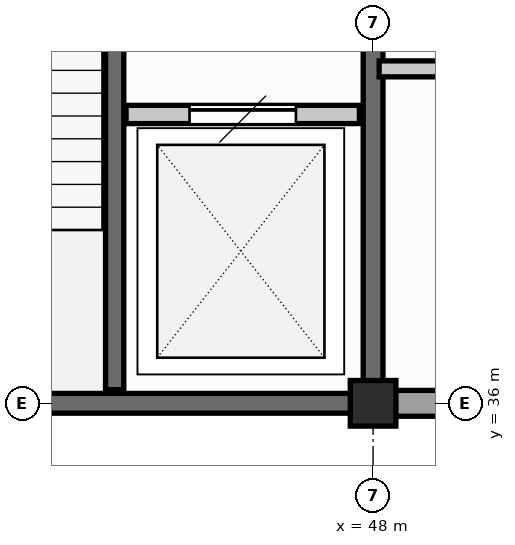
"""IFC4 building model, lengths in metres.
Left out: names, types, materials, properties, quantities, classifications, styles, units other than length and angle.
Written with IfcOpenShell. Run it as: python <this file> out.ifc"""

import sys

from ifc_helpers import new_model, si_unit, direction, frame, frame_2d, origin, origin_2d, place, context, subcontext, project, spatial, rectangle, extrude, element, fill, save


model = new_model("IFC4")
c1 = context("Model", 3, precision=1e-05, world=origin(), true_north=direction((0.0, 1.0)))
c2 = subcontext(c1, "Body", "Model", "MODEL_VIEW")
j1 = project(units=[si_unit("LENGTHUNIT", "METRE"), si_unit("PLANEANGLEUNIT", "RADIAN")], contexts=[c1])
p1 = place(None, origin())
s1 = spatial("IfcSite", under=j1, at=p1, CompositionType="ELEMENT")
p2 = place(p1, origin())
s2 = spatial("IfcBuilding", under=s1, at=p2, CompositionType="ELEMENT")
p3 = place(p2, frame((0.0, 0.0, 9.0)))
s3 = spatial("IfcBuildingStorey", under=s2, at=p3, CompositionType="ELEMENT", Elevation=9.0)
p4 = place(p3, frame((48.0, 36.0, 0.0), z_axis=(0.0, 0.0, 1.0), x_axis=(1.0, 0.0, 0.0)))
e1 = element("IfcColumn", 1, at=p4, inside=s3, PredefinedType="COLUMN", context=c2, shape_type="SweptSolid", body=[
    extrude(rectangle(XDim=0.6, YDim=0.6, at=origin_2d()), origin(), (0.0, 0.0, 1.0), 4.2),
])
p5 = place(p3, frame((48.295, 36.0, 0.0), z_axis=(0.0, 0.0, 1.0), x_axis=(1.0, 0.0, 0.0)))
e2 = element("IfcWall", 2, at=p5, inside=s3, PredefinedType="SOLIDWALL", context=c2, shape_type="SweptSolid", body=[
    extrude(rectangle(XDim=7.41, YDim=0.34, at=frame_2d((3.705, 0.0))), origin(), (0.0, 0.0, 1.0), 3.05),
])
p6 = place(p3, frame((40.295, 36.0, 0.0), z_axis=(0.0, 0.0, 1.0), x_axis=(1.0, 0.0, 0.0)))
e3 = element("IfcWall", 3, at=p6, inside=s3, PredefinedType="SHEAR", context=c2, shape_type="SweptSolid", body=[
    extrude(rectangle(XDim=7.41, YDim=0.26, at=frame_2d((3.705, 0.0))), origin(), (0.0, 0.0, 1.0), 3.985),
])
p7 = place(p3, frame((48.0, 36.295, 0.0), z_axis=(0.0, 0.0, 1.0), x_axis=(0.0, 1.0, 0.0)))
e4 = element("IfcWall", 4, at=p7, inside=s3, PredefinedType="SHEAR", context=c2, shape_type="SweptSolid", body=[
    extrude(rectangle(XDim=8.41, YDim=0.26, at=frame_2d((4.205, 0.0))), origin(), (0.0, 0.0, 1.0), 3.985),
])
p8 = place(p7, frame((5.75, 0.0, 0.0)))
e5 = element("IfcOpeningElement", 5, at=p8, cuts=e4, PredefinedType="OPENING", context=c2, shape_type="SweptSolid", body=[
    extrude(rectangle(XDim=1.65, YDim=2.22, at=frame_2d((0.825, 1.11))), frame((0.0, 0.14, 0.0), z_axis=(0.0, -1.0, 0.0), x_axis=(1.0, 0.0, 0.0)), (0.0, 0.0, 1.0), 0.28),
])
p9 = place(p3, frame((44.6, 36.18, 0.0), z_axis=(0.0, 0.0, 1.0), x_axis=(0.0, 1.0, 0.0)))
e6 = element("IfcWall", 6, at=p9, inside=s3, PredefinedType="SHEAR", context=c2, shape_type="SweptSolid", body=[
    extrude(rectangle(XDim=8.64, YDim=0.24, at=frame_2d((4.32, 0.0))), origin(), (0.0, 0.0, 1.0), 3.985),
])
p10 = place(p9, frame((6.02, 0.0, 0.0)))
e7 = element("IfcOpeningElement", 7, at=p10, cuts=e6, PredefinedType="OPENING", context=c2, shape_type="SweptSolid", body=[
    extrude(rectangle(XDim=1.38, YDim=2.22, at=frame_2d((0.69, 1.11))), frame((0.0, 0.13, 0.0), z_axis=(0.0, -1.0, 0.0), x_axis=(1.0, 0.0, 0.0)), (0.0, 0.0, 1.0), 0.26),
])
p11 = place(p9, frame((7.68, 0.0, 0.0)))
e8 = element("IfcOpeningElement", 8, at=p11, cuts=e6, PredefinedType="OPENING", context=c2, shape_type="SweptSolid", body=[
    extrude(rectangle(XDim=0.9, YDim=2.05, at=frame_2d((0.45, 1.025))), frame((0.0, 0.13, 0.0), z_axis=(0.0, -1.0, 0.0), x_axis=(1.0, 0.0, 0.0)), (0.0, 0.0, 1.0), 0.26),
])
p12 = place(p3, frame((44.75, 39.8, 0.0), z_axis=(0.0, 0.0, 1.0), x_axis=(1.0, 0.0, 0.0)))
e9 = element("IfcWall", 9, at=p12, inside=s3, PredefinedType="SHEAR", context=c2, shape_type="SweptSolid", body=[
    extrude(rectangle(XDim=3.07, YDim=0.24, at=frame_2d((1.535, 0.0))), origin(), (0.0, 0.0, 1.0), 3.335),
])
p13 = place(p12, frame((0.835, 0.0, 0.0)))
e10 = element("IfcOpeningElement", 10, at=p13, cuts=e9, PredefinedType="OPENING", context=c2, shape_type="SweptSolid", body=[
    extrude(rectangle(XDim=1.4, YDim=2.3, at=frame_2d((0.7, 1.15))), frame((0.0, 0.13, 0.0), z_axis=(0.0, -1.0, 0.0), x_axis=(1.0, 0.0, 0.0)), (0.0, 0.0, 1.0), 0.26),
])
p14 = place(p3, frame((48.08, 40.4, 0.0), z_axis=(0.0, 0.0, 1.0), x_axis=(1.0, 0.0, 0.0)))
e11 = element("IfcWall", 11, at=p14, inside=s3, PredefinedType="PARTITIONING", context=c2, shape_type="SweptSolid", body=[
    extrude(rectangle(XDim=7.86, YDim=0.21, at=frame_2d((3.93, 0.0))), origin(), (0.0, 0.0, 1.0), 3.05),
])
p15 = place(p14, frame((3.005, 0.0, 0.0)))
e12 = element("IfcOpeningElement", 12, at=p15, cuts=e11, PredefinedType="OPENING", context=c2, shape_type="SweptSolid", body=[
    extrude(rectangle(XDim=1.85, YDim=2.45, at=frame_2d((0.925, 1.225))), frame((0.0, 0.115, 0.0), z_axis=(0.0, -1.0, 0.0), x_axis=(1.0, 0.0, 0.0)), (0.0, 0.0, 1.0), 0.23),
])
p16 = place(p13, origin())
e13 = element("IfcDoor", 13, at=p16, inside=s3, OperationType="SLIDING_TO_LEFT", PredefinedType="DOOR", context=c2, shape_type="SweptSolid", body=[
    extrude(rectangle(XDim=1.4, YDim=2.3, at=frame_2d((0.7, 1.15))), frame((0.0, 0.025, 0.0), z_axis=(0.0, -1.0, 0.0), x_axis=(1.0, 0.0, 0.0)), (0.0, 0.0, 1.0), 0.05),
])
fill(e10, e13)
save(model, sys.argv[1])
